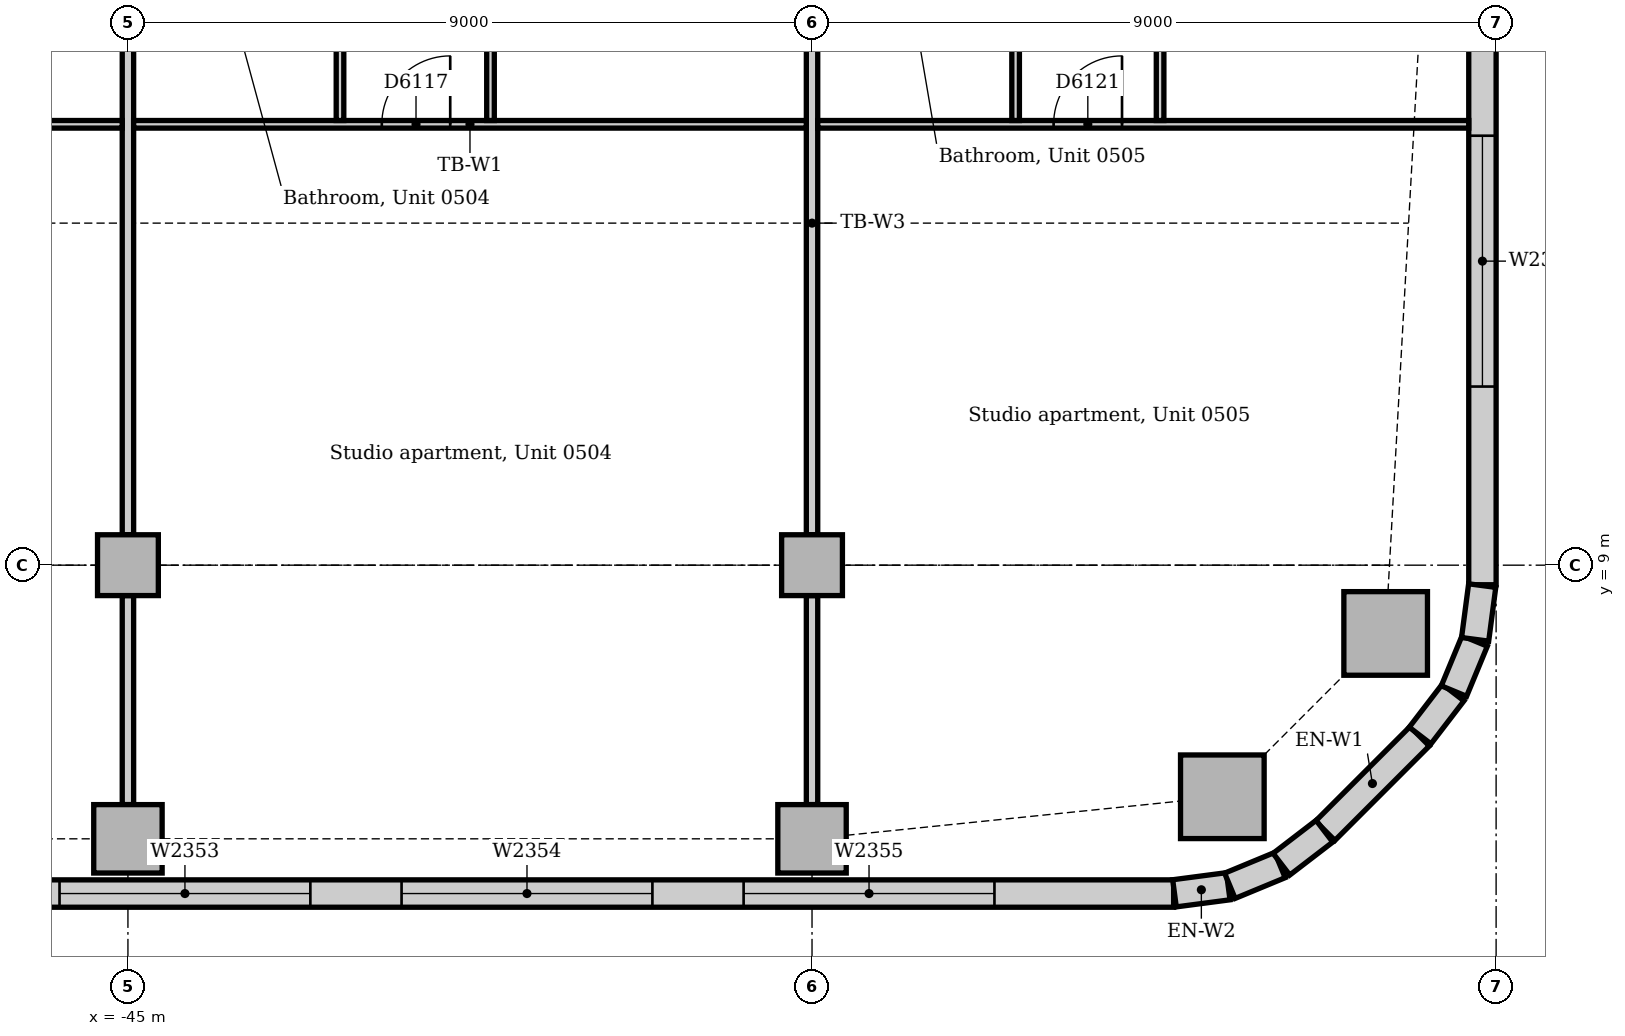
"""IFC4 building model, lengths in metres.
Left out: names, types, materials, properties, quantities, classifications, styles, units other than length and angle.
Written with IfcOpenShell. Run it as: python <this file> out.ifc"""

import sys

from ifc_helpers import new_model, si_unit, direction, frame, frame_2d, origin, origin_2d, place, context, subcontext, project, spatial, rectangle, extrude, element, fill, save


model = new_model("IFC4")
c1 = context("Model", 3, precision=1e-05, world=origin(), true_north=direction((0.0, 1.0)))
c2 = subcontext(c1, "Body", "Model", "MODEL_VIEW")
j1 = project(units=[si_unit("LENGTHUNIT", "METRE"), si_unit("PLANEANGLEUNIT", "RADIAN")], contexts=[c1])
p1 = place(None, origin())
s1 = spatial("IfcSite", under=j1, at=p1, CompositionType="ELEMENT")
p2 = place(p1, origin())
s2 = spatial("IfcBuilding", under=s1, at=p2, CompositionType="ELEMENT")
p3 = place(p2, frame((0.0, 0.0, 26.0)))
s3 = spatial("IfcBuildingStorey", under=s2, at=p3, CompositionType="ELEMENT", Elevation=26.0)
for number, where, z_axis, x_axis in (
    (1, (-30.602, 5.953, 0.0), (0.0, 0.0, 1.0), (1.0, 0.0, 0.0)),
    (2, (-28.453, 8.102, 0.0), (0.0, 0.0, 1.0), (1.0, 0.0, 0.0)),
):
    element("IfcColumn", number, at=place(p3, frame(where, z_axis=z_axis, x_axis=x_axis)), inside=s3, PredefinedType="COLUMN", context=c2, shape_type="SweptSolid", body=[
        extrude(rectangle(XDim=1.1, YDim=1.1, at=origin_2d()), origin(), (0.0, 0.0, 1.0), 3.85),
    ])
for number, where, z_axis, x_axis in (
    (3, (-45.0, 5.4, 0.0), (0.0, 0.0, 1.0), (1.0, 0.0, 0.0)),
    (4, (-36.0, 5.4, 0.0), (0.0, 0.0, 1.0), (1.0, 0.0, 0.0)),
):
    element("IfcColumn", number, at=place(p3, frame(where, z_axis=z_axis, x_axis=x_axis)), inside=s3, PredefinedType="COLUMN", context=c2, shape_type="SweptSolid", body=[
        extrude(rectangle(XDim=0.9, YDim=0.9, at=origin_2d()), origin(), (0.0, 0.0, 1.0), 3.85),
    ])
for number, where, z_axis, x_axis in (
    (5, (-45.0, 9.0, 0.0), (0.0, 0.0, 1.0), (1.0, 0.0, 0.0)),
    (6, (-36.0, 9.0, 0.0), (0.0, 0.0, 1.0), (1.0, 0.0, 0.0)),
):
    element("IfcColumn", number, at=place(p3, frame(where, z_axis=z_axis, x_axis=x_axis)), inside=s3, PredefinedType="COLUMN", context=c2, shape_type="SweptSolid", body=[
        extrude(rectangle(XDim=0.8, YDim=0.8, at=origin_2d()), origin(), (0.0, 0.0, 1.0), 3.85),
    ])
p4 = place(p3, frame((-61.757, 4.68, 0.0), z_axis=(0.0, 0.0, 1.0), x_axis=(1.0, 0.0, 0.0)))
e7 = element("IfcWall", 7, at=p4, inside=s3, PredefinedType="STANDARD", context=c2, shape_type="SweptSolid", body=[
    extrude(rectangle(XDim=30.515, YDim=0.36, at=frame_2d((15.257, 0.0))), origin(), (0.0, 0.0, 1.0), 3.85),
])
p5 = place(p4, frame((2.357, 0.0, 0.9)))
e8 = element("IfcOpeningElement", 8, at=p5, cuts=e7, PredefinedType="OPENING", context=c2, shape_type="SweptSolid", body=[
    extrude(rectangle(XDim=3.3, YDim=1.6, at=frame_2d((1.65, 0.8))), frame((0.0, 0.19, 0.0), z_axis=(0.0, -1.0, 0.0), x_axis=(1.0, 0.0, 0.0)), (0.0, 0.0, 1.0), 0.38),
])
p6 = place(p4, frame((6.857, 0.0, 0.9)))
e9 = element("IfcOpeningElement", 9, at=p6, cuts=e7, PredefinedType="OPENING", context=c2, shape_type="SweptSolid", body=[
    extrude(rectangle(XDim=3.3, YDim=1.6, at=frame_2d((1.65, 0.8))), frame((0.0, 0.19, 0.0), z_axis=(0.0, -1.0, 0.0), x_axis=(1.0, 0.0, 0.0)), (0.0, 0.0, 1.0), 0.38),
])
p7 = place(p4, frame((11.357, 0.0, 0.9)))
e10 = element("IfcOpeningElement", 10, at=p7, cuts=e7, PredefinedType="OPENING", context=c2, shape_type="SweptSolid", body=[
    extrude(rectangle(XDim=3.3, YDim=1.6, at=frame_2d((1.65, 0.8))), frame((0.0, 0.19, 0.0), z_axis=(0.0, -1.0, 0.0), x_axis=(1.0, 0.0, 0.0)), (0.0, 0.0, 1.0), 0.38),
])
p8 = place(p4, frame((15.857, 0.0, 0.9)))
e11 = element("IfcOpeningElement", 11, at=p8, cuts=e7, PredefinedType="OPENING", context=c2, shape_type="SweptSolid", body=[
    extrude(rectangle(XDim=3.3, YDim=1.6, at=frame_2d((1.65, 0.8))), frame((0.0, 0.19, 0.0), z_axis=(0.0, -1.0, 0.0), x_axis=(1.0, 0.0, 0.0)), (0.0, 0.0, 1.0), 0.38),
])
p9 = place(p4, frame((20.357, 0.0, 0.9)))
e12 = element("IfcOpeningElement", 12, at=p9, cuts=e7, PredefinedType="OPENING", context=c2, shape_type="SweptSolid", body=[
    extrude(rectangle(XDim=3.3, YDim=1.6, at=frame_2d((1.65, 0.8))), frame((0.0, 0.19, 0.0), z_axis=(0.0, -1.0, 0.0), x_axis=(1.0, 0.0, 0.0)), (0.0, 0.0, 1.0), 0.38),
])
p10 = place(p4, frame((24.857, 0.0, 0.9)))
e13 = element("IfcOpeningElement", 13, at=p10, cuts=e7, PredefinedType="OPENING", context=c2, shape_type="SweptSolid", body=[
    extrude(rectangle(XDim=3.3, YDim=1.6, at=frame_2d((1.65, 0.8))), frame((0.0, 0.19, 0.0), z_axis=(0.0, -1.0, 0.0), x_axis=(1.0, 0.0, 0.0)), (0.0, 0.0, 1.0), 0.38),
])
p11 = place(p3, frame((-29.249, 5.506, 0.0), z_axis=(0.0, 0.0, 1.0), x_axis=(0.707106781187, 0.707106781187, 0.0)))
e14 = element("IfcWall", 14, at=p11, inside=s3, PredefinedType="STANDARD", context=c2, shape_type="SweptSolid", body=[
    extrude(rectangle(XDim=1.757, YDim=0.36, at=frame_2d((0.879, 0.0))), origin(), (0.0, 0.0, 1.0), 3.85),
])
p12 = place(p3, frame((-27.18, 8.743, 0.0), z_axis=(0.0, 0.0, 1.0), x_axis=(0.0, 1.0, 0.0)))
e15 = element("IfcWall", 15, at=p12, inside=s3, PredefinedType="STANDARD", context=c2, shape_type="SweptSolid", body=[
    extrude(rectangle(XDim=12.257, YDim=0.36, at=frame_2d((6.129, 0.0))), origin(), (0.0, 0.0, 1.0), 3.85),
])
p13 = place(p12, frame((2.607, 0.0, 0.9)))
e16 = element("IfcOpeningElement", 16, at=p13, cuts=e15, PredefinedType="OPENING", context=c2, shape_type="SweptSolid", body=[
    extrude(rectangle(XDim=3.3, YDim=1.6, at=frame_2d((1.65, 0.8))), frame((0.0, 0.19, 0.0), z_axis=(0.0, -1.0, 0.0), x_axis=(1.0, 0.0, 0.0)), (0.0, 0.0, 1.0), 0.38),
])
p14 = place(p12, frame((7.607, 0.0, 0.9)))
e17 = element("IfcOpeningElement", 17, at=p14, cuts=e15, PredefinedType="OPENING", context=c2, shape_type="SweptSolid", body=[
    extrude(rectangle(XDim=3.3, YDim=1.6, at=frame_2d((1.65, 0.8))), frame((0.0, 0.19, 0.0), z_axis=(0.0, -1.0, 0.0), x_axis=(1.0, 0.0, 0.0)), (0.0, 0.0, 1.0), 0.38),
])
for number, where, z_axis, x_axis in (
    (18, (-31.231, 4.683, 0.0), (0.0, 0.0, 1.0), (0.991, 0.131, 0.0)),
    (19, (-30.503, 4.782, 0.0), (0.0, 0.0, 1.0), (0.924, 0.383, 0.0)),
):
    element("IfcWall", number, at=place(p3, frame(where, z_axis=z_axis, x_axis=x_axis)), inside=s3, PredefinedType="STANDARD", context=c2, shape_type="SweptSolid", body=[
        extrude(rectangle(XDim=0.713, YDim=0.36, at=frame_2d((0.356, 0.0))), origin(), (0.0, 0.0, 1.0), 3.85),
    ])
for number, where, z_axis, x_axis in (
    (20, (-29.825, 5.066, 0.0), (0.0, 0.0, 1.0), (0.793, 0.609, 0.0)),
    (21, (-28.0, 6.759, 0.0), (0.0, 0.0, 1.0), (0.609, 0.793, 0.0)),
):
    element("IfcWall", number, at=place(p3, frame(where, z_axis=z_axis, x_axis=x_axis)), inside=s3, PredefinedType="STANDARD", context=c2, shape_type="SweptSolid", body=[
        extrude(rectangle(XDim=0.713, YDim=0.36, at=frame_2d((0.357, 0.0))), origin(), (0.0, 0.0, 1.0), 3.85),
    ])
for number, where, z_axis, x_axis in (
    (22, (-27.555, 7.344, 0.0), (0.0, 0.0, 1.0), (0.383, 0.924, 0.0)),
    (23, (-27.276, 8.024, 0.0), (0.0, 0.0, 1.0), (0.131, 0.991, 0.0)),
):
    element("IfcWall", number, at=place(p3, frame(where, z_axis=z_axis, x_axis=x_axis)), inside=s3, PredefinedType="STANDARD", context=c2, shape_type="SweptSolid", body=[
        extrude(rectangle(XDim=0.713, YDim=0.36, at=frame_2d((0.356, 0.0))), origin(), (0.0, 0.0, 1.0), 3.85),
    ])
p15 = place(p3, frame((-45.0, 9.4, 0.0), z_axis=(0.0, 0.0, 1.0), x_axis=(0.0, 1.0, 0.0)))
e24 = element("IfcWall", 24, at=p15, inside=s3, PredefinedType="PARTITIONING", context=c2, shape_type="SweptSolid", body=[
    extrude(rectangle(XDim=8.2, YDim=0.15, at=frame_2d((4.1, 0.0))), origin(), (0.0, 0.0, 1.0), 3.158),
])
p16 = place(p3, frame((-45.0, 5.85, 0.0), z_axis=(0.0, 0.0, 1.0), x_axis=(0.0, 1.0, 0.0)))
e25 = element("IfcWall", 25, at=p16, inside=s3, PredefinedType="PARTITIONING", context=c2, shape_type="SweptSolid", body=[
    extrude(rectangle(XDim=2.75, YDim=0.15, at=frame_2d((1.375, 0.0))), origin(), (0.0, 0.0, 1.0), 3.652),
])
p17 = place(p3, frame((-36.0, 9.4, 0.0), z_axis=(0.0, 0.0, 1.0), x_axis=(0.0, 1.0, 0.0)))
e26 = element("IfcWall", 26, at=p17, inside=s3, PredefinedType="PARTITIONING", context=c2, shape_type="SweptSolid", body=[
    extrude(rectangle(XDim=8.2, YDim=0.15, at=frame_2d((4.1, 0.0))), origin(), (0.0, 0.0, 1.0), 3.158),
])
p18 = place(p3, frame((-36.0, 5.85, 0.0), z_axis=(0.0, 0.0, 1.0), x_axis=(0.0, 1.0, 0.0)))
e27 = element("IfcWall", 27, at=p18, inside=s3, PredefinedType="PARTITIONING", context=c2, shape_type="SweptSolid", body=[
    extrude(rectangle(XDim=2.75, YDim=0.15, at=frame_2d((1.375, 0.0))), origin(), (0.0, 0.0, 1.0), 3.652),
])
p19 = place(p3, frame((-53.925, 14.8, 0.0), z_axis=(0.0, 0.0, 1.0), x_axis=(1.0, 0.0, 0.0)))
e28 = element("IfcWall", 28, at=p19, inside=s3, PredefinedType="PARTITIONING", context=c2, shape_type="SweptSolid", body=[
    extrude(rectangle(XDim=8.85, YDim=0.1, at=frame_2d((4.425, 0.0))), origin(), (0.0, 0.0, 1.0), 3.85),
])
p20 = place(p19, frame((3.265, 0.0, 0.0)))
e29 = element("IfcOpeningElement", 29, at=p20, cuts=e28, PredefinedType="OPENING", context=c2, shape_type="SweptSolid", body=[
    extrude(rectangle(XDim=0.9, YDim=2.1, at=frame_2d((0.45, 1.05))), frame((0.0, 0.06, 0.0), z_axis=(0.0, -1.0, 0.0), x_axis=(1.0, 0.0, 0.0)), (0.0, 0.0, 1.0), 0.12),
])
p21 = place(p3, frame((-44.925, 14.8, 0.0), z_axis=(0.0, 0.0, 1.0), x_axis=(1.0, 0.0, 0.0)))
e30 = element("IfcWall", 30, at=p21, inside=s3, PredefinedType="PARTITIONING", context=c2, shape_type="SweptSolid", body=[
    extrude(rectangle(XDim=8.85, YDim=0.1, at=frame_2d((4.425, 0.0))), origin(), (0.0, 0.0, 1.0), 3.85),
])
p22 = place(p21, frame((3.265, 0.0, 0.0)))
e31 = element("IfcOpeningElement", 31, at=p22, cuts=e30, PredefinedType="OPENING", context=c2, shape_type="SweptSolid", body=[
    extrude(rectangle(XDim=0.9, YDim=2.1, at=frame_2d((0.45, 1.05))), frame((0.0, 0.06, 0.0), z_axis=(0.0, -1.0, 0.0), x_axis=(1.0, 0.0, 0.0)), (0.0, 0.0, 1.0), 0.12),
])
p23 = place(p3, frame((-35.925, 14.8, 0.0), z_axis=(0.0, 0.0, 1.0), x_axis=(1.0, 0.0, 0.0)))
e32 = element("IfcWall", 32, at=p23, inside=s3, PredefinedType="PARTITIONING", context=c2, shape_type="SweptSolid", body=[
    extrude(rectangle(XDim=8.565, YDim=0.1, at=frame_2d((4.282, 0.0))), origin(), (0.0, 0.0, 1.0), 3.85),
])
p24 = place(p23, frame((3.103, 0.0, 0.0)))
e33 = element("IfcOpeningElement", 33, at=p24, cuts=e32, PredefinedType="OPENING", context=c2, shape_type="SweptSolid", body=[
    extrude(rectangle(XDim=0.9, YDim=2.1, at=frame_2d((0.45, 1.05))), frame((0.0, 0.06, 0.0), z_axis=(0.0, -1.0, 0.0), x_axis=(1.0, 0.0, 0.0)), (0.0, 0.0, 1.0), 0.12),
])
p25 = place(p3, frame((-42.21, 14.85, 0.0), z_axis=(0.0, 0.0, 1.0), x_axis=(0.0, 1.0, 0.0)))
e34 = element("IfcWall", 34, at=p25, inside=s3, PredefinedType="PARTITIONING", context=c2, shape_type="SweptSolid", body=[
    extrude(rectangle(XDim=3.075, YDim=0.1, at=frame_2d((1.538, 0.0))), origin(), (0.0, 0.0, 1.0), 3.85),
])
p26 = place(p25, frame((1.1, 0.0, 0.0)))
e35 = element("IfcOpeningElement", 35, at=p26, cuts=e34, PredefinedType="OPENING", context=c2, shape_type="SweptSolid", body=[
    extrude(rectangle(XDim=0.9, YDim=2.1, at=frame_2d((0.45, 1.05))), frame((0.0, 0.06, 0.0), z_axis=(0.0, -1.0, 0.0), x_axis=(1.0, 0.0, 0.0)), (0.0, 0.0, 1.0), 0.12),
])
p27 = place(p3, frame((-40.23, 14.85, 0.0), z_axis=(0.0, 0.0, 1.0), x_axis=(0.0, 1.0, 0.0)))
e36 = element("IfcWall", 36, at=p27, inside=s3, PredefinedType="PARTITIONING", context=c2, shape_type="SweptSolid", body=[
    extrude(rectangle(XDim=3.075, YDim=0.1, at=frame_2d((1.538, 0.0))), origin(), (0.0, 0.0, 1.0), 3.85),
])
p28 = place(p27, frame((1.1, 0.0, 0.0)))
e37 = element("IfcOpeningElement", 37, at=p28, cuts=e36, PredefinedType="OPENING", context=c2, shape_type="SweptSolid", body=[
    extrude(rectangle(XDim=0.9, YDim=2.1, at=frame_2d((0.45, 1.05))), frame((0.0, 0.06, 0.0), z_axis=(0.0, -1.0, 0.0), x_axis=(1.0, 0.0, 0.0)), (0.0, 0.0, 1.0), 0.12),
])
p29 = place(p3, frame((-33.322, 14.85, 0.0), z_axis=(0.0, 0.0, 1.0), x_axis=(0.0, 1.0, 0.0)))
e38 = element("IfcWall", 38, at=p29, inside=s3, PredefinedType="PARTITIONING", context=c2, shape_type="SweptSolid", body=[
    extrude(rectangle(XDim=3.075, YDim=0.1, at=frame_2d((1.538, 0.0))), origin(), (0.0, 0.0, 1.0), 3.85),
])
p30 = place(p29, frame((1.1, 0.0, 0.0)))
e39 = element("IfcOpeningElement", 39, at=p30, cuts=e38, PredefinedType="OPENING", context=c2, shape_type="SweptSolid", body=[
    extrude(rectangle(XDim=0.9, YDim=2.1, at=frame_2d((0.45, 1.05))), frame((0.0, 0.06, 0.0), z_axis=(0.0, -1.0, 0.0), x_axis=(1.0, 0.0, 0.0)), (0.0, 0.0, 1.0), 0.12),
])
p31 = place(p3, frame((-31.421, 14.85, 0.0), z_axis=(0.0, 0.0, 1.0), x_axis=(0.0, 1.0, 0.0)))
e40 = element("IfcWall", 40, at=p31, inside=s3, PredefinedType="PARTITIONING", context=c2, shape_type="SweptSolid", body=[
    extrude(rectangle(XDim=3.075, YDim=0.1, at=frame_2d((1.538, 0.0))), origin(), (0.0, 0.0, 1.0), 3.85),
])
p32 = place(p31, frame((1.1, 0.0, 0.0)))
e41 = element("IfcOpeningElement", 41, at=p32, cuts=e40, PredefinedType="OPENING", context=c2, shape_type="SweptSolid", body=[
    extrude(rectangle(XDim=0.9, YDim=2.1, at=frame_2d((0.45, 1.05))), frame((0.0, 0.06, 0.0), z_axis=(0.0, -1.0, 0.0), x_axis=(1.0, 0.0, 0.0)), (0.0, 0.0, 1.0), 0.12),
])
p33 = place(p8, origin())
e42 = element("IfcWindow", 42, at=p33, inside=s3, PartitioningType="SINGLE_PANEL", PredefinedType="WINDOW", context=c2, shape_type="SweptSolid", body=[
    extrude(rectangle(XDim=3.3, YDim=1.6, at=frame_2d((1.65, 0.8))), frame((0.0, 0.13, 0.0), z_axis=(0.0, -1.0, 0.0), x_axis=(1.0, 0.0, 0.0)), (0.0, 0.0, 1.0), 0.06),
])
fill(e11, e42)
p34 = place(p9, origin())
e43 = element("IfcWindow", 43, at=p34, inside=s3, PartitioningType="SINGLE_PANEL", PredefinedType="WINDOW", context=c2, shape_type="SweptSolid", body=[
    extrude(rectangle(XDim=3.3, YDim=1.6, at=frame_2d((1.65, 0.8))), frame((0.0, 0.13, 0.0), z_axis=(0.0, -1.0, 0.0), x_axis=(1.0, 0.0, 0.0)), (0.0, 0.0, 1.0), 0.06),
])
fill(e12, e43)
p35 = place(p10, origin())
e44 = element("IfcWindow", 44, at=p35, inside=s3, PartitioningType="SINGLE_PANEL", PredefinedType="WINDOW", context=c2, shape_type="SweptSolid", body=[
    extrude(rectangle(XDim=3.3, YDim=1.6, at=frame_2d((1.65, 0.8))), frame((0.0, 0.13, 0.0), z_axis=(0.0, -1.0, 0.0), x_axis=(1.0, 0.0, 0.0)), (0.0, 0.0, 1.0), 0.06),
])
fill(e13, e44)
p36 = place(p13, origin())
e45 = element("IfcWindow", 45, at=p36, inside=s3, PartitioningType="SINGLE_PANEL", PredefinedType="WINDOW", context=c2, shape_type="SweptSolid", body=[
    extrude(rectangle(XDim=3.3, YDim=1.6, at=frame_2d((1.65, 0.8))), frame((0.0, 0.13, 0.0), z_axis=(0.0, -1.0, 0.0), x_axis=(1.0, 0.0, 0.0)), (0.0, 0.0, 1.0), 0.06),
])
fill(e16, e45)
p37 = place(p22, origin())
e46 = element("IfcDoor", 46, at=p37, inside=s3, OperationType="SINGLE_SWING_RIGHT", PredefinedType="DOOR", context=c2, shape_type="SweptSolid", body=[
    extrude(rectangle(XDim=0.9, YDim=2.1, at=frame_2d((0.45, 1.05))), frame((0.0, 0.025, 0.0), z_axis=(0.0, -1.0, 0.0), x_axis=(1.0, 0.0, 0.0)), (0.0, 0.0, 1.0), 0.05),
])
fill(e31, e46)
p38 = place(p24, origin())
e47 = element("IfcDoor", 47, at=p38, inside=s3, OperationType="SINGLE_SWING_RIGHT", PredefinedType="DOOR", context=c2, shape_type="SweptSolid", body=[
    extrude(rectangle(XDim=0.9, YDim=2.1, at=frame_2d((0.45, 1.05))), frame((0.0, 0.025, 0.0), z_axis=(0.0, -1.0, 0.0), x_axis=(1.0, 0.0, 0.0)), (0.0, 0.0, 1.0), 0.05),
])
fill(e33, e47)
save(model, sys.argv[1])
